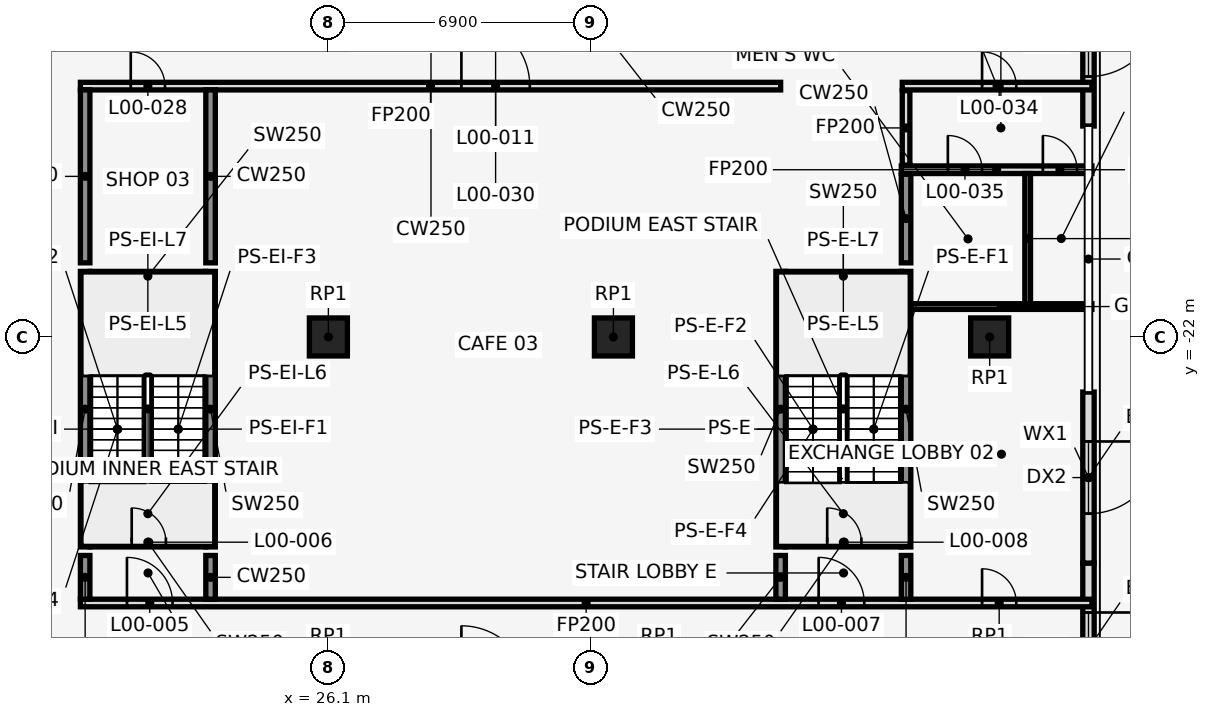
"""IFC4 building model, lengths in metres.
Left out: names, types, materials, properties, quantities, classifications, styles, units other than length and angle.
Written with IfcOpenShell. Run it as: python <this file> out.ifc"""

import sys

from ifc_helpers import new_model, si_unit, direction, frame, frame_2d, origin, origin_2d, place, context, subcontext, project, spatial, rectangle, extrude, element, fill, save


model = new_model("IFC4")
c1 = context("Model", 3, precision=1e-05, world=origin(), true_north=direction((0.0, 1.0)))
c2 = subcontext(c1, "Body", "Model", "MODEL_VIEW")
j1 = project(units=[si_unit("LENGTHUNIT", "METRE"), si_unit("PLANEANGLEUNIT", "RADIAN")], contexts=[c1])
p1 = place(None, origin())
s1 = spatial("IfcSite", under=j1, at=p1, CompositionType="ELEMENT")
p2 = place(p1, origin())
s2 = spatial("IfcBuilding", under=s1, at=p2, CompositionType="ELEMENT")
p3 = place(p2, origin())
s3 = spatial("IfcBuildingStorey", under=s2, at=p3, CompositionType="ELEMENT", Elevation=0.0)
for number, where, z_axis, x_axis in (
    (1, (33.6, -22.0, 0.0), (0.0, 0.0, 1.0), (1.0, 0.0, 0.0)),
    (2, (26.1, -22.0, 0.0), (0.0, 0.0, 1.0), (1.0, 0.0, 0.0)),
    (3, (43.5, -22.0, 0.0), (0.0, 0.0, 1.0), (1.0, 0.0, 0.0)),
):
    element("IfcColumn", number, at=place(p3, frame(where, z_axis=z_axis, x_axis=x_axis)), inside=s3, PredefinedType="COLUMN", context=c2, shape_type="SweptSolid", body=[
        extrude(rectangle(XDim=1.0, YDim=1.0, at=origin_2d()), origin(), (0.0, 0.0, 1.0), 8.0),
    ])
p4 = place(p3, frame((46.1, -27.95, 0.0), z_axis=(0.0, 0.0, 1.0), x_axis=(0.0, -1.0, 0.0)))
e4 = element("IfcWall", 4, at=p4, inside=s3, PredefinedType="STANDARD", context=c2, shape_type="SweptSolid", body=[
    extrude(rectangle(XDim=4.5, YDim=0.3, at=frame_2d((2.25, 0.0))), origin(), (0.0, 0.0, 1.0), 7.7),
])
p5 = place(p4, frame((1.3, 0.0, 0.0)))
e5 = element("IfcOpeningElement", 5, at=p5, cuts=e4, PredefinedType="OPENING", context=c2, shape_type="SweptSolid", body=[
    extrude(rectangle(XDim=1.9, YDim=2.6, at=frame_2d((0.95, 1.3))), frame((0.0, 0.162, 0.0), z_axis=(0.0, -1.0, 0.0), x_axis=(1.0, 0.0, 0.0)), (0.0, 0.0, 1.0), 0.324),
])
p6 = place(p4, frame((1.3, 0.0, 3.3)))
e6 = element("IfcOpeningElement", 6, at=p6, cuts=e4, PredefinedType="OPENING", context=c2, shape_type="SweptSolid", body=[
    extrude(rectangle(XDim=1.9, YDim=3.0, at=frame_2d((0.95, 1.5))), frame((0.0, 0.162, 0.0), z_axis=(0.0, -1.0, 0.0), x_axis=(1.0, 0.0, 0.0)), (0.0, 0.0, 1.0), 0.324),
])
p7 = place(p3, frame((46.1, -23.45, 0.0), z_axis=(0.0, 0.0, 1.0), x_axis=(0.0, -1.0, 0.0)))
e7 = element("IfcWall", 7, at=p7, inside=s3, PredefinedType="STANDARD", context=c2, shape_type="SweptSolid", body=[
    extrude(rectangle(XDim=4.5, YDim=0.3, at=frame_2d((2.25, 0.0))), origin(), (0.0, 0.0, 1.0), 7.7),
])
p8 = place(p7, frame((1.3, 0.0, 0.0)))
e8 = element("IfcOpeningElement", 8, at=p8, cuts=e7, PredefinedType="OPENING", context=c2, shape_type="SweptSolid", body=[
    extrude(rectangle(XDim=1.9, YDim=2.6, at=frame_2d((0.95, 1.3))), frame((0.0, 0.162, 0.0), z_axis=(0.0, -1.0, 0.0), x_axis=(1.0, 0.0, 0.0)), (0.0, 0.0, 1.0), 0.324),
])
p9 = place(p7, frame((1.3, 0.0, 3.3)))
e9 = element("IfcOpeningElement", 9, at=p9, cuts=e7, PredefinedType="OPENING", context=c2, shape_type="SweptSolid", body=[
    extrude(rectangle(XDim=1.9, YDim=3.0, at=frame_2d((0.95, 1.5))), frame((0.0, 0.162, 0.0), z_axis=(0.0, -1.0, 0.0), x_axis=(1.0, 0.0, 0.0)), (0.0, 0.0, 1.0), 0.324),
])
p10 = place(p3, frame((46.1, -11.95, 0.0), z_axis=(0.0, 0.0, 1.0), x_axis=(0.0, -1.0, 0.0)))
e10 = element("IfcWall", 10, at=p10, inside=s3, PredefinedType="STANDARD", context=c2, shape_type="SweptSolid", body=[
    extrude(rectangle(XDim=4.5, YDim=0.3, at=frame_2d((2.25, 0.0))), origin(), (0.0, 0.0, 1.0), 7.7),
])
p11 = place(p10, frame((1.3, 0.0, 0.0)))
e11 = element("IfcOpeningElement", 11, at=p11, cuts=e10, PredefinedType="OPENING", context=c2, shape_type="SweptSolid", body=[
    extrude(rectangle(XDim=1.9, YDim=2.6, at=frame_2d((0.95, 1.3))), frame((0.0, 0.162, 0.0), z_axis=(0.0, -1.0, 0.0), x_axis=(1.0, 0.0, 0.0)), (0.0, 0.0, 1.0), 0.324),
])
p12 = place(p10, frame((1.3, 0.0, 3.3)))
e12 = element("IfcOpeningElement", 12, at=p12, cuts=e10, PredefinedType="OPENING", context=c2, shape_type="SweptSolid", body=[
    extrude(rectangle(XDim=1.9, YDim=3.0, at=frame_2d((0.95, 1.5))), frame((0.0, 0.162, 0.0), z_axis=(0.0, -1.0, 0.0), x_axis=(1.0, 0.0, 0.0)), (0.0, 0.0, 1.0), 0.324),
])
for number, where, z_axis, x_axis in (
    (13, (19.7, -27.525, 0.0), (0.0, 0.0, 1.0), (0.0, 1.0, 0.0)),
    (14, (23.0, -27.525, 0.0), (0.0, 0.0, 1.0), (0.0, 1.0, 0.0)),
):
    element("IfcWall", number, at=place(p3, frame(where, z_axis=z_axis, x_axis=x_axis)), inside=s3, PredefinedType="SHEAR", context=c2, shape_type="SweptSolid", body=[
        extrude(rectangle(XDim=7.25, YDim=0.25, at=frame_2d((3.625, 0.0))), origin(), (0.0, 0.0, 1.0), 8.0),
    ])
p13 = place(p3, frame((19.825, -27.4, 0.0), z_axis=(0.0, 0.0, 1.0), x_axis=(1.0, 0.0, 0.0)))
e15 = element("IfcWall", 15, at=p13, inside=s3, PredefinedType="SHEAR", context=c2, shape_type="SweptSolid", body=[
    extrude(rectangle(XDim=3.05, YDim=0.25, at=frame_2d((1.525, 0.0))), origin(), (0.0, 0.0, 1.0), 8.0),
])
p14 = place(p13, frame((1.1, 0.0, 0.0)))
e16 = element("IfcOpeningElement", 16, at=p14, cuts=e15, PredefinedType="OPENING", context=c2, shape_type="SweptSolid", body=[
    extrude(rectangle(XDim=0.9, YDim=2.1, at=frame_2d((0.45, 1.05))), frame((0.0, 0.137, 0.0), z_axis=(0.0, -1.0, 0.0), x_axis=(1.0, 0.0, 0.0)), (0.0, 0.0, 1.0), 0.274),
])
p15 = place(p3, frame((19.825, -20.4, 0.0), z_axis=(0.0, 0.0, 1.0), x_axis=(1.0, 0.0, 0.0)))
e17 = element("IfcWall", 17, at=p15, inside=s3, PredefinedType="SHEAR", context=c2, shape_type="SweptSolid", body=[
    extrude(rectangle(XDim=3.05, YDim=0.25, at=frame_2d((1.525, 0.0))), origin(), (0.0, 0.0, 1.0), 8.0),
])
for number, where, z_axis, x_axis in (
    (18, (38.0, -27.525, 0.0), (0.0, 0.0, 1.0), (0.0, 1.0, 0.0)),
    (19, (41.3, -27.525, 0.0), (0.0, 0.0, 1.0), (0.0, 1.0, 0.0)),
):
    element("IfcWall", number, at=place(p3, frame(where, z_axis=z_axis, x_axis=x_axis)), inside=s3, PredefinedType="SHEAR", context=c2, shape_type="SweptSolid", body=[
        extrude(rectangle(XDim=7.25, YDim=0.25, at=frame_2d((3.625, 0.0))), origin(), (0.0, 0.0, 1.0), 8.0),
    ])
p16 = place(p3, frame((38.125, -27.4, 0.0), z_axis=(0.0, 0.0, 1.0), x_axis=(1.0, 0.0, 0.0)))
e20 = element("IfcWall", 20, at=p16, inside=s3, PredefinedType="SHEAR", context=c2, shape_type="SweptSolid", body=[
    extrude(rectangle(XDim=3.05, YDim=0.25, at=frame_2d((1.525, 0.0))), origin(), (0.0, 0.0, 1.0), 8.0),
])
p17 = place(p16, frame((1.1, 0.0, 0.0)))
e21 = element("IfcOpeningElement", 21, at=p17, cuts=e20, PredefinedType="OPENING", context=c2, shape_type="SweptSolid", body=[
    extrude(rectangle(XDim=0.9, YDim=2.1, at=frame_2d((0.45, 1.05))), frame((0.0, 0.137, 0.0), z_axis=(0.0, -1.0, 0.0), x_axis=(1.0, 0.0, 0.0)), (0.0, 0.0, 1.0), 0.274),
])
p18 = place(p3, frame((38.125, -20.4, 0.0), z_axis=(0.0, 0.0, 1.0), x_axis=(1.0, 0.0, 0.0)))
e22 = element("IfcWall", 22, at=p18, inside=s3, PredefinedType="SHEAR", context=c2, shape_type="SweptSolid", body=[
    extrude(rectangle(XDim=3.05, YDim=0.25, at=frame_2d((1.525, 0.0))), origin(), (0.0, 0.0, 1.0), 8.0),
])
p19 = place(p3, frame((19.575, -29.0, 0.0), z_axis=(0.0, 0.0, 1.0), x_axis=(1.0, 0.0, 0.0)))
e23 = element("IfcWall", 23, at=p19, inside=s3, PredefinedType="PARTITIONING", context=c2, shape_type="SweptSolid", body=[
    extrude(rectangle(XDim=26.615, YDim=0.2, at=frame_2d((13.308, 0.0))), origin(), (0.0, 0.0, 1.0), 7.7),
])
p20 = place(p19, frame((1.225, 0.0, 0.0)))
e24 = element("IfcOpeningElement", 24, at=p20, cuts=e23, PredefinedType="OPENING", context=c2, shape_type="SweptSolid", body=[
    extrude(rectangle(XDim=1.2, YDim=2.1, at=frame_2d((0.6, 1.05))), frame((0.0, 0.112, 0.0), z_axis=(0.0, -1.0, 0.0), x_axis=(1.0, 0.0, 0.0)), (0.0, 0.0, 1.0), 0.224),
])
p21 = place(p19, frame((19.425, 0.0, 0.0)))
e25 = element("IfcOpeningElement", 25, at=p21, cuts=e23, PredefinedType="OPENING", context=c2, shape_type="SweptSolid", body=[
    extrude(rectangle(XDim=1.2, YDim=2.1, at=frame_2d((0.6, 1.05))), frame((0.0, 0.112, 0.0), z_axis=(0.0, -1.0, 0.0), x_axis=(1.0, 0.0, 0.0)), (0.0, 0.0, 1.0), 0.224),
])
p22 = place(p19, frame((23.725, 0.0, 0.0)))
e26 = element("IfcOpeningElement", 26, at=p22, cuts=e23, PredefinedType="OPENING", context=c2, shape_type="SweptSolid", body=[
    extrude(rectangle(XDim=0.9, YDim=2.1, at=frame_2d((0.45, 1.05))), frame((0.0, 0.112, 0.0), z_axis=(0.0, -1.0, 0.0), x_axis=(1.0, 0.0, 0.0)), (0.0, 0.0, 1.0), 0.224),
])
p23 = place(p3, frame((41.425, -21.2, 0.0), z_axis=(0.0, 0.0, 1.0), x_axis=(1.0, 0.0, 0.0)))
e27 = element("IfcWall", 27, at=p23, inside=s3, PredefinedType="PARTITIONING", context=c2, shape_type="SweptSolid", body=[
    extrude(rectangle(XDim=4.765, YDim=0.15, at=frame_2d((2.382, 0.0))), origin(), (0.0, 0.0, 1.0), 7.7),
])
p24 = place(p3, frame((41.175, -17.6, 0.0), z_axis=(0.0, 0.0, 1.0), x_axis=(1.0, 0.0, 0.0)))
e28 = element("IfcWall", 28, at=p24, inside=s3, PredefinedType="PARTITIONING", context=c2, shape_type="SweptSolid", body=[
    extrude(rectangle(XDim=5.015, YDim=0.2, at=frame_2d((2.507, 0.0))), origin(), (0.0, 0.0, 1.0), 7.7),
])
p25 = place(p24, frame((1.225, 0.0, 0.0)))
e29 = element("IfcOpeningElement", 29, at=p25, cuts=e28, PredefinedType="OPENING", context=c2, shape_type="SweptSolid", body=[
    extrude(rectangle(XDim=0.9, YDim=2.1, at=frame_2d((0.45, 1.05))), frame((0.0, 0.112, 0.0), z_axis=(0.0, -1.0, 0.0), x_axis=(1.0, 0.0, 0.0)), (0.0, 0.0, 1.0), 0.224),
])
p26 = place(p24, frame((3.725, 0.0, 0.0)))
e30 = element("IfcOpeningElement", 30, at=p26, cuts=e28, PredefinedType="OPENING", context=c2, shape_type="SweptSolid", body=[
    extrude(rectangle(XDim=0.9, YDim=2.1, at=frame_2d((0.45, 1.05))), frame((0.0, 0.112, 0.0), z_axis=(0.0, -1.0, 0.0), x_axis=(1.0, 0.0, 0.0)), (0.0, 0.0, 1.0), 0.224),
])
p27 = place(p3, frame((19.575, -15.4, 0.0), z_axis=(0.0, 0.0, 1.0), x_axis=(1.0, 0.0, 0.0)))
e31 = element("IfcWall", 31, at=p27, inside=s3, PredefinedType="PARTITIONING", context=c2, shape_type="SweptSolid", body=[
    extrude(rectangle(XDim=18.425, YDim=0.2, at=frame_2d((9.212, 0.0))), origin(), (0.0, 0.0, 1.0), 7.7),
])
p28 = place(p27, frame((1.325, 0.0, 0.0)))
e32 = element("IfcOpeningElement", 32, at=p28, cuts=e31, PredefinedType="OPENING", context=c2, shape_type="SweptSolid", body=[
    extrude(rectangle(XDim=0.9, YDim=2.1, at=frame_2d((0.45, 1.05))), frame((0.0, 0.112, 0.0), z_axis=(0.0, -1.0, 0.0), x_axis=(1.0, 0.0, 0.0)), (0.0, 0.0, 1.0), 0.224),
])
p29 = place(p27, frame((10.025, 0.0, 0.0)))
e33 = element("IfcOpeningElement", 33, at=p29, cuts=e31, PredefinedType="OPENING", context=c2, shape_type="SweptSolid", body=[
    extrude(rectangle(XDim=1.8, YDim=2.1, at=frame_2d((0.9, 1.05))), frame((0.0, 0.112, 0.0), z_axis=(0.0, -1.0, 0.0), x_axis=(1.0, 0.0, 0.0)), (0.0, 0.0, 1.0), 0.224),
])
p30 = place(p3, frame((41.2, -15.4, 0.0), z_axis=(0.0, 0.0, 1.0), x_axis=(1.0, 0.0, 0.0)))
e34 = element("IfcWall", 34, at=p30, inside=s3, PredefinedType="PARTITIONING", context=c2, shape_type="SweptSolid", body=[
    extrude(rectangle(XDim=4.99, YDim=0.2, at=frame_2d((2.495, 0.0))), origin(), (0.0, 0.0, 1.0), 7.7),
])
p31 = place(p30, frame((2.1, 0.0, 0.0)))
e35 = element("IfcOpeningElement", 35, at=p31, cuts=e34, PredefinedType="OPENING", context=c2, shape_type="SweptSolid", body=[
    extrude(rectangle(XDim=0.9, YDim=2.1, at=frame_2d((0.45, 1.05))), frame((0.0, 0.112, 0.0), z_axis=(0.0, -1.0, 0.0), x_axis=(1.0, 0.0, 0.0)), (0.0, 0.0, 1.0), 0.224),
])
p32 = place(p3, frame((19.7, -28.9, 0.0), z_axis=(0.0, 0.0, 1.0), x_axis=(0.0, 1.0, 0.0)))
e36 = element("IfcWall", 36, at=p32, inside=s3, PredefinedType="SHEAR", context=c2, shape_type="SweptSolid", body=[
    extrude(rectangle(XDim=1.15, YDim=0.25, at=frame_2d((0.575, 0.0))), origin(), (0.0, 0.0, 1.0), 8.0),
])
p33 = place(p3, frame((19.7, -20.05, 0.0), z_axis=(0.0, 0.0, 1.0), x_axis=(0.0, 1.0, 0.0)))
e37 = element("IfcWall", 37, at=p33, inside=s3, PredefinedType="SHEAR", context=c2, shape_type="SweptSolid", body=[
    extrude(rectangle(XDim=4.55, YDim=0.25, at=frame_2d((2.275, 0.0))), origin(), (0.0, 0.0, 1.0), 8.0),
])
p34 = place(p3, frame((23.0, -28.9, 0.0), z_axis=(0.0, 0.0, 1.0), x_axis=(0.0, 1.0, 0.0)))
e38 = element("IfcWall", 38, at=p34, inside=s3, PredefinedType="SHEAR", context=c2, shape_type="SweptSolid", body=[
    extrude(rectangle(XDim=1.15, YDim=0.25, at=frame_2d((0.575, 0.0))), origin(), (0.0, 0.0, 1.0), 8.0),
])
p35 = place(p3, frame((23.0, -20.05, 0.0), z_axis=(0.0, 0.0, 1.0), x_axis=(0.0, 1.0, 0.0)))
e39 = element("IfcWall", 39, at=p35, inside=s3, PredefinedType="SHEAR", context=c2, shape_type="SweptSolid", body=[
    extrude(rectangle(XDim=4.55, YDim=0.25, at=frame_2d((2.275, 0.0))), origin(), (0.0, 0.0, 1.0), 8.0),
])
for number, where, z_axis, x_axis in (
    (40, (38.0, -28.9, 0.0), (0.0, 0.0, 1.0), (0.0, 1.0, 0.0)),
    (41, (41.3, -28.9, 0.0), (0.0, 0.0, 1.0), (0.0, 1.0, 0.0)),
):
    element("IfcWall", number, at=place(p3, frame(where, z_axis=z_axis, x_axis=x_axis)), inside=s3, PredefinedType="SHEAR", context=c2, shape_type="SweptSolid", body=[
        extrude(rectangle(XDim=1.15, YDim=0.25, at=frame_2d((0.575, 0.0))), origin(), (0.0, 0.0, 1.0), 8.0),
    ])
p36 = place(p3, frame((41.3, -20.05, 0.0), z_axis=(0.0, 0.0, 1.0), x_axis=(0.0, 1.0, 0.0)))
e42 = element("IfcWall", 42, at=p36, inside=s3, PredefinedType="SHEAR", context=c2, shape_type="SweptSolid", body=[
    extrude(rectangle(XDim=2.33, YDim=0.25, at=frame_2d((1.165, 0.0))), origin(), (0.0, 0.0, 1.0), 8.0),
])
p37 = place(p3, frame((41.3, -17.48, 0.0), z_axis=(0.0, 0.0, 1.0), x_axis=(0.0, 1.0, 0.0)))
e43 = element("IfcWall", 43, at=p37, inside=s3, PredefinedType="PARTITIONING", context=c2, shape_type="SweptSolid", body=[
    extrude(rectangle(XDim=1.96, YDim=0.2, at=frame_2d((0.98, 0.0))), origin(), (0.0, 0.0, 1.0), 7.7),
])
p38 = place(p3, frame((44.5, -21.125, 0.0), z_axis=(0.0, 0.0, 1.0), x_axis=(0.0, 1.0, 0.0)))
e44 = element("IfcWall", 44, at=p38, inside=s3, PredefinedType="PARTITIONING", context=c2, shape_type="SweptSolid", body=[
    extrude(rectangle(XDim=3.425, YDim=0.15, at=frame_2d((1.712, 0.0))), origin(), (0.0, 0.0, 1.0), 7.7),
])
p39 = place(p5, origin())
e45 = element("IfcDoor", 45, at=p39, inside=s3, OperationType="SINGLE_SWING_LEFT", PredefinedType="DOOR", context=c2, shape_type="SweptSolid", body=[
    extrude(rectangle(XDim=1.9, YDim=2.6, at=frame_2d((0.95, 1.3))), frame((0.0, 0.025, 0.0), z_axis=(0.0, -1.0, 0.0), x_axis=(1.0, 0.0, 0.0)), (0.0, 0.0, 1.0), 0.05),
])
fill(e5, e45)
p40 = place(p6, origin())
e46 = element("IfcWindow", 46, at=p40, inside=s3, PartitioningType="SINGLE_PANEL", PredefinedType="WINDOW", context=c2, shape_type="SweptSolid", body=[
    extrude(rectangle(XDim=1.9, YDim=3.0, at=frame_2d((0.95, 1.5))), frame((0.0, 0.03, 0.0), z_axis=(0.0, -1.0, 0.0), x_axis=(1.0, 0.0, 0.0)), (0.0, 0.0, 1.0), 0.06),
])
fill(e6, e46)
p41 = place(p8, origin())
e47 = element("IfcDoor", 47, at=p41, inside=s3, OperationType="SINGLE_SWING_LEFT", PredefinedType="DOOR", context=c2, shape_type="SweptSolid", body=[
    extrude(rectangle(XDim=1.9, YDim=2.6, at=frame_2d((0.95, 1.3))), frame((0.0, 0.025, 0.0), z_axis=(0.0, -1.0, 0.0), x_axis=(1.0, 0.0, 0.0)), (0.0, 0.0, 1.0), 0.05),
])
fill(e8, e47)
p42 = place(p9, origin())
e48 = element("IfcWindow", 48, at=p42, inside=s3, PartitioningType="SINGLE_PANEL", PredefinedType="WINDOW", context=c2, shape_type="SweptSolid", body=[
    extrude(rectangle(XDim=1.9, YDim=3.0, at=frame_2d((0.95, 1.5))), frame((0.0, 0.03, 0.0), z_axis=(0.0, -1.0, 0.0), x_axis=(1.0, 0.0, 0.0)), (0.0, 0.0, 1.0), 0.06),
])
fill(e9, e48)
p43 = place(p11, origin())
e49 = element("IfcDoor", 49, at=p43, inside=s3, OperationType="SINGLE_SWING_LEFT", PredefinedType="DOOR", context=c2, shape_type="SweptSolid", body=[
    extrude(rectangle(XDim=1.9, YDim=2.6, at=frame_2d((0.95, 1.3))), frame((0.0, 0.025, 0.0), z_axis=(0.0, -1.0, 0.0), x_axis=(1.0, 0.0, 0.0)), (0.0, 0.0, 1.0), 0.05),
])
fill(e11, e49)
p44 = place(p12, origin())
e50 = element("IfcWindow", 50, at=p44, inside=s3, PartitioningType="SINGLE_PANEL", PredefinedType="WINDOW", context=c2, shape_type="SweptSolid", body=[
    extrude(rectangle(XDim=1.9, YDim=3.0, at=frame_2d((0.95, 1.5))), frame((0.0, 0.03, 0.0), z_axis=(0.0, -1.0, 0.0), x_axis=(1.0, 0.0, 0.0)), (0.0, 0.0, 1.0), 0.06),
])
fill(e12, e50)
p45 = place(p20, origin())
e51 = element("IfcDoor", 51, at=p45, inside=s3, OperationType="SINGLE_SWING_LEFT", PredefinedType="DOOR", context=c2, shape_type="SweptSolid", body=[
    extrude(rectangle(XDim=1.2, YDim=2.1, at=frame_2d((0.6, 1.05))), frame((0.0, 0.025, 0.0), z_axis=(0.0, -1.0, 0.0), x_axis=(1.0, 0.0, 0.0)), (0.0, 0.0, 1.0), 0.05),
])
fill(e24, e51)
p46 = place(p14, origin())
e52 = element("IfcDoor", 52, at=p46, inside=s3, OperationType="SINGLE_SWING_RIGHT", PredefinedType="DOOR", context=c2, shape_type="SweptSolid", body=[
    extrude(rectangle(XDim=0.9, YDim=2.1, at=frame_2d((0.45, 1.05))), frame((0.0, 0.025, 0.0), z_axis=(0.0, -1.0, 0.0), x_axis=(1.0, 0.0, 0.0)), (0.0, 0.0, 1.0), 0.05),
])
fill(e16, e52)
p47 = place(p21, origin())
e53 = element("IfcDoor", 53, at=p47, inside=s3, OperationType="SINGLE_SWING_LEFT", PredefinedType="DOOR", context=c2, shape_type="SweptSolid", body=[
    extrude(rectangle(XDim=1.2, YDim=2.1, at=frame_2d((0.6, 1.05))), frame((0.0, 0.025, 0.0), z_axis=(0.0, -1.0, 0.0), x_axis=(1.0, 0.0, 0.0)), (0.0, 0.0, 1.0), 0.05),
])
fill(e25, e53)
p48 = place(p17, origin())
e54 = element("IfcDoor", 54, at=p48, inside=s3, OperationType="SINGLE_SWING_LEFT", PredefinedType="DOOR", context=c2, shape_type="SweptSolid", body=[
    extrude(rectangle(XDim=0.9, YDim=2.1, at=frame_2d((0.45, 1.05))), frame((0.0, 0.025, 0.0), z_axis=(0.0, -1.0, 0.0), x_axis=(1.0, 0.0, 0.0)), (0.0, 0.0, 1.0), 0.05),
])
fill(e21, e54)
p49 = place(p28, frame((0.9, 0.0, 0.0), z_axis=(0.0, 0.0, 1.0), x_axis=(-1.0, 0.0, 0.0)))
e55 = element("IfcDoor", 55, at=p49, inside=s3, OperationType="SINGLE_SWING_LEFT", PredefinedType="DOOR", context=c2, shape_type="SweptSolid", body=[
    extrude(rectangle(XDim=0.9, YDim=2.1, at=frame_2d((0.45, 1.05))), frame((0.0, 0.025, 0.0), z_axis=(0.0, -1.0, 0.0), x_axis=(1.0, 0.0, 0.0)), (0.0, 0.0, 1.0), 0.05),
])
fill(e32, e55)
p50 = place(p29, origin())
e56 = element("IfcDoor", 56, at=p50, inside=s3, OperationType="SINGLE_SWING_LEFT", PredefinedType="DOOR", context=c2, shape_type="SweptSolid", body=[
    extrude(rectangle(XDim=1.8, YDim=2.1, at=frame_2d((0.9, 1.05))), frame((0.0, 0.025, 0.0), z_axis=(0.0, -1.0, 0.0), x_axis=(1.0, 0.0, 0.0)), (0.0, 0.0, 1.0), 0.05),
])
fill(e33, e56)
p51 = place(p22, origin())
e57 = element("IfcDoor", 57, at=p51, inside=s3, OperationType="SINGLE_SWING_LEFT", PredefinedType="DOOR", context=c2, shape_type="SweptSolid", body=[
    extrude(rectangle(XDim=0.9, YDim=2.1, at=frame_2d((0.45, 1.05))), frame((0.0, 0.025, 0.0), z_axis=(0.0, -1.0, 0.0), x_axis=(1.0, 0.0, 0.0)), (0.0, 0.0, 1.0), 0.05),
])
fill(e26, e57)
p52 = place(p31, frame((0.9, 0.0, 0.0), z_axis=(0.0, 0.0, 1.0), x_axis=(-1.0, 0.0, 0.0)))
e58 = element("IfcDoor", 58, at=p52, inside=s3, OperationType="SINGLE_SWING_LEFT", PredefinedType="DOOR", context=c2, shape_type="SweptSolid", body=[
    extrude(rectangle(XDim=0.9, YDim=2.1, at=frame_2d((0.45, 1.05))), frame((0.0, 0.025, 0.0), z_axis=(0.0, -1.0, 0.0), x_axis=(1.0, 0.0, 0.0)), (0.0, 0.0, 1.0), 0.05),
])
fill(e35, e58)
p53 = place(p25, frame((0.9, 0.0, 0.0), z_axis=(0.0, 0.0, 1.0), x_axis=(-1.0, 0.0, 0.0)))
e59 = element("IfcDoor", 59, at=p53, inside=s3, OperationType="SINGLE_SWING_RIGHT", PredefinedType="DOOR", context=c2, shape_type="SweptSolid", body=[
    extrude(rectangle(XDim=0.9, YDim=2.1, at=frame_2d((0.45, 1.05))), frame((0.0, 0.025, 0.0), z_axis=(0.0, -1.0, 0.0), x_axis=(1.0, 0.0, 0.0)), (0.0, 0.0, 1.0), 0.05),
])
fill(e29, e59)
p54 = place(p26, frame((0.9, 0.0, 0.0), z_axis=(0.0, 0.0, 1.0), x_axis=(-1.0, 0.0, 0.0)))
e60 = element("IfcDoor", 60, at=p54, inside=s3, OperationType="SINGLE_SWING_RIGHT", PredefinedType="DOOR", context=c2, shape_type="SweptSolid", body=[
    extrude(rectangle(XDim=0.9, YDim=2.1, at=frame_2d((0.45, 1.05))), frame((0.0, 0.025, 0.0), z_axis=(0.0, -1.0, 0.0), x_axis=(1.0, 0.0, 0.0)), (0.0, 0.0, 1.0), 0.05),
])
fill(e30, e60)
save(model, sys.argv[1])
